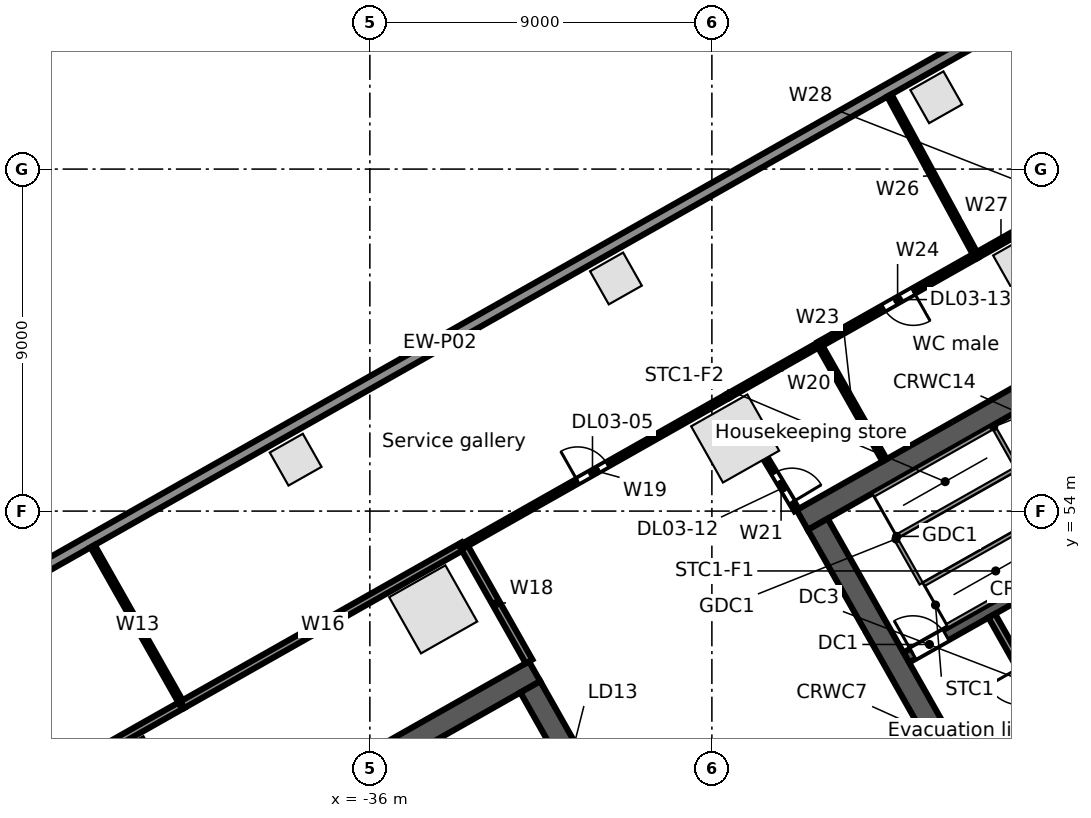
"""IFC4 building model, lengths in metres.
Left out: names, types, materials, properties, quantities, classifications, styles, units other than length and angle.
Written with IfcOpenShell. Run it as: python <this file> out.ifc"""

import sys

from ifc_helpers import new_model, si_unit, direction, frame, frame_2d, origin, origin_2d, place, context, subcontext, project, spatial, rectangle, extrude, element, fill, save


model = new_model("IFC4")
c1 = context("Model", 3, precision=1e-05, world=origin(), true_north=direction((0.0, 1.0)))
c2 = subcontext(c1, "Body", "Model", "MODEL_VIEW")
j1 = project(units=[si_unit("LENGTHUNIT", "METRE"), si_unit("PLANEANGLEUNIT", "RADIAN")], contexts=[c1])
p1 = place(None, origin())
s1 = spatial("IfcSite", under=j1, at=p1, CompositionType="ELEMENT")
p2 = place(p1, origin())
s2 = spatial("IfcBuilding", under=s1, at=p2, CompositionType="ELEMENT")
p3 = place(p2, frame((0.0, 0.0, 16.5)))
s3 = spatial("IfcBuildingStorey", under=s2, at=p3, CompositionType="ELEMENT", Elevation=16.5)
for number, where, z_axis, x_axis in (
    (1, (-18.441, 60.406, 0.0), (0.0, 0.0, 1.0), (-0.87, -0.492, 0.0)),
    (2, (-26.388, 55.91, 0.0), (0.0, 0.0, 1.0), (-0.87, -0.492, 0.0)),
    (3, (-34.334, 51.414, 0.0), (0.0, 0.0, 1.0), (-0.87, -0.492, 0.0)),
    (4, (-42.28, 46.919, 0.0), (0.0, 0.0, 1.0), (-0.87, -0.492, 0.0)),
):
    element("IfcColumn", number, at=place(p3, frame(where, z_axis=z_axis, x_axis=x_axis)), inside=s3, PredefinedType="COLUMN", context=c2, shape_type="SweptSolid", body=[
        extrude(rectangle(XDim=1.7, YDim=1.7, at=origin_2d()), origin(), (0.0, 0.0, 1.0), 5.0),
    ])
for number, where, z_axis, x_axis in (
    (5, (-21.096, 64.89, 0.0), (0.0, 0.0, 1.0), (-0.87, -0.492, 0.0)),
    (6, (-29.524, 60.122, 0.0), (0.0, 0.0, 1.0), (-0.87, -0.492, 0.0)),
    (7, (-37.953, 55.353, 0.0), (0.0, 0.0, 1.0), (-0.87, -0.492, 0.0)),
):
    element("IfcColumn", number, at=place(p3, frame(where, z_axis=z_axis, x_axis=x_axis)), inside=s3, PredefinedType="COLUMN", context=c2, shape_type="SweptSolid", body=[
        extrude(rectangle(XDim=1.0, YDim=1.0, at=origin_2d()), origin(), (0.0, 0.0, 1.0), 5.0),
    ])
p4 = place(p3, frame((-63.707, 41.701, 0.0), z_axis=(0.0, 0.0, 1.0), x_axis=(0.870355510268, 0.492423888277, 0.0)))
e8 = element("IfcWall", 8, at=p4, inside=s3, PredefinedType="STANDARD", context=c2, shape_type="SweptSolid", body=[
    extrude(rectangle(XDim=67.903, YDim=0.3, at=frame_2d((33.952, 0.0))), origin(), (0.0, 0.0, 1.0), 4.65),
])
p5 = place(p3, frame((-46.461, 41.412, 0.0), z_axis=(0.0, 0.0, 1.0), x_axis=(0.870350116061, 0.492433422375, 0.0)))
e9 = element("IfcWall", 9, at=p5, inside=s3, PredefinedType="SOLIDWALL", context=c2, shape_type="SweptSolid", body=[
    extrude(rectangle(XDim=17.0, YDim=0.6, at=frame_2d((8.5, 0.0))), origin(), (0.0, 0.0, 1.0), 4.65),
])
p6 = place(p3, frame((-31.778, 49.374, 0.0), z_axis=(0.0, 0.0, 1.0), x_axis=(0.492433046652, -0.870350328641, 0.0)))
e10 = element("IfcWall", 10, at=p6, inside=s3, PredefinedType="SOLIDWALL", context=c2, shape_type="SweptSolid", body=[
    extrude(rectangle(XDim=12.8, YDim=0.6, at=frame_2d((6.4, 0.0))), origin(), (0.0, 0.0, 1.0), 4.65),
])
p7 = place(p3, frame((-19.718, 46.316, 0.0), z_axis=(0.0, 0.0, 1.0), x_axis=(0.870353963862, 0.492426621528, 0.0)))
e11 = element("IfcWall", 11, at=p7, inside=s3, PredefinedType="SOLIDWALL", context=c2, shape_type="SweptSolid", body=[
    extrude(rectangle(XDim=4.9, YDim=0.3, at=frame_2d((2.45, 0.0))), origin(), (0.0, 0.0, 1.0), 4.65),
])
p8 = place(p7, frame((0.55, 0.0, 0.0)))
e12 = element("IfcOpeningElement", 12, at=p8, cuts=e11, PredefinedType="OPENING", context=c2, shape_type="SweptSolid", body=[
    extrude(rectangle(XDim=1.1, YDim=2.1, at=frame_2d((0.55, 1.05))), frame((0.0, 0.16, 0.0), z_axis=(0.0, -1.0, 0.0), x_axis=(1.0, 0.0, 0.0)), (0.0, 0.0, 1.0), 0.32),
])
p9 = place(p7, frame((3.65, 0.0, 0.0)))
e13 = element("IfcOpeningElement", 13, at=p9, cuts=e11, PredefinedType="OPENING", context=c2, shape_type="SweptSolid", body=[
    extrude(rectangle(XDim=0.9, YDim=2.1, at=frame_2d((0.45, 1.05))), frame((0.0, 0.16, 0.0), z_axis=(0.0, -1.0, 0.0), x_axis=(1.0, 0.0, 0.0)), (0.0, 0.0, 1.0), 0.32),
])
p10 = place(p3, frame((-21.885, 50.146, 0.0), z_axis=(0.0, 0.0, 1.0), x_axis=(0.870359411463, 0.492416992881, 0.0)))
e14 = element("IfcWall", 14, at=p10, inside=s3, PredefinedType="SOLIDWALL", context=c2, shape_type="SweptSolid", body=[
    extrude(rectangle(XDim=7.2, YDim=0.3, at=frame_2d((3.6, 0.0))), origin(), (0.0, 0.0, 1.0), 4.65),
])
p11 = place(p10, frame((0.2, 0.0, 0.0)))
e15 = element("IfcOpeningElement", 15, at=p11, cuts=e14, PredefinedType="OPENING", context=c2, shape_type="SweptSolid", body=[
    extrude(rectangle(XDim=1.0, YDim=2.1, at=frame_2d((0.5, 1.05))), frame((0.0, 0.16, 0.0), z_axis=(0.0, -1.0, 0.0), x_axis=(1.0, 0.0, 0.0)), (0.0, 0.0, 1.0), 0.32),
])
p12 = place(p3, frame((-24.623, 53.767, 0.0), z_axis=(0.0, 0.0, 1.0), x_axis=(0.870356627484, 0.492421913601, 0.0)))
e16 = element("IfcWall", 16, at=p12, inside=s3, PredefinedType="SOLIDWALL", context=c2, shape_type="SweptSolid", body=[
    extrude(rectangle(XDim=15.0, YDim=0.6, at=frame_2d((7.5, 0.0))), origin(), (0.0, 0.0, 1.0), 4.65),
])
p13 = place(p3, frame((-24.214, 53.654, 0.0), z_axis=(0.0, 0.0, 1.0), x_axis=(0.492441221355, -0.870345703448, 0.0)))
e17 = element("IfcWall", 17, at=p13, inside=s3, PredefinedType="SOLIDWALL", context=c2, shape_type="SweptSolid", body=[
    extrude(rectangle(XDim=12.8, YDim=0.6, at=frame_2d((6.4, 0.0))), origin(), (0.0, 0.0, 1.0), 4.65),
])
p14 = place(p3, frame((-19.635, 51.246, 0.0), z_axis=(0.0, 0.0, 1.0), x_axis=(0.492408451753, -0.87036424366, 0.0)))
e18 = element("IfcWall", 18, at=p14, inside=s3, PredefinedType="PARTITIONING", context=c2, shape_type="SweptSolid", body=[
    extrude(rectangle(XDim=4.1, YDim=0.2, at=frame_2d((2.05, 0.0))), origin(), (0.0, 0.0, 1.0), 4.65),
])
p15 = place(p14, frame((1.55, 0.0, 0.0)))
e19 = element("IfcOpeningElement", 19, at=p15, cuts=e18, PredefinedType="OPENING", context=c2, shape_type="SweptSolid", body=[
    extrude(rectangle(XDim=1.0, YDim=2.1, at=frame_2d((0.5, 1.05))), frame((0.0, 0.11, 0.0), z_axis=(0.0, -1.0, 0.0), x_axis=(1.0, 0.0, 0.0)), (0.0, 0.0, 1.0), 0.22),
])
p16 = place(p3, frame((-48.332, 44.719, 0.0), z_axis=(0.0, 0.0, 1.0), x_axis=(0.870331650579, 0.492466057713, 0.0)))
e20 = element("IfcWall", 20, at=p16, inside=s3, PredefinedType="PARTITIONING", context=c2, shape_type="SweptSolid", body=[
    extrude(rectangle(XDim=8.5, YDim=0.2, at=frame_2d((4.25, 0.0))), origin(), (0.0, 0.0, 1.0), 4.03),
])
p17 = place(p16, frame((3.45, 0.0, 0.0)))
e21 = element("IfcOpeningElement", 21, at=p17, cuts=e20, PredefinedType="OPENING", context=c2, shape_type="SweptSolid", body=[
    extrude(rectangle(XDim=1.8, YDim=2.1, at=frame_2d((0.9, 1.05))), frame((0.0, 0.11, 0.0), z_axis=(0.0, -1.0, 0.0), x_axis=(1.0, 0.0, 0.0)), (0.0, 0.0, 1.0), 0.22),
])
p18 = place(p3, frame((-43.295, 53.077, 0.0), z_axis=(0.0, 0.0, 1.0), x_axis=(0.492503605136, -0.87031040378, 0.0)))
e22 = element("IfcWall", 22, at=p18, inside=s3, PredefinedType="PARTITIONING", context=c2, shape_type="SweptSolid", body=[
    extrude(rectangle(XDim=4.793, YDim=0.125, at=frame_2d((2.397, 0.0))), origin(), (0.0, 0.0, 1.0), 3.93),
])
p19 = place(p3, frame((-40.934, 48.905, 0.0), z_axis=(0.0, 0.0, 1.0), x_axis=(0.870387854278, 0.492366716102, 0.0)))
e23 = element("IfcWall", 23, at=p19, inside=s3, PredefinedType="PARTITIONING", context=c2, shape_type="SweptSolid", body=[
    extrude(rectangle(XDim=8.5, YDim=0.2, at=frame_2d((4.25, 0.0))), origin(), (0.0, 0.0, 1.0), 4.03),
])
p20 = place(p3, frame((-33.536, 53.09, 0.0), z_axis=(0.0, 0.0, 1.0), x_axis=(0.492521469645, -0.870300294116, 0.0)))
e24 = element("IfcWall", 24, at=p20, inside=s3, PredefinedType="PARTITIONING", context=c2, shape_type="SweptSolid", body=[
    extrude(rectangle(XDim=3.5, YDim=0.2, at=frame_2d((1.75, 0.0))), origin(), (0.0, 0.0, 1.0), 3.93),
])
p21 = place(p3, frame((-33.536, 53.09, 0.0), z_axis=(0.0, 0.0, 1.0), x_axis=(0.870327439455, 0.492473499928, 0.0)))
e25 = element("IfcWall", 25, at=p21, inside=s3, PredefinedType="PARTITIONING", context=c2, shape_type="SweptSolid", body=[
    extrude(rectangle(XDim=8.0, YDim=0.125, at=frame_2d((4.0, 0.0))), origin(), (0.0, 0.0, 1.0), 3.712),
])
p22 = place(p21, frame((3.45, 0.0, 0.0)))
e26 = element("IfcOpeningElement", 26, at=p22, cuts=e25, PredefinedType="OPENING", context=c2, shape_type="SweptSolid", body=[
    extrude(rectangle(XDim=0.9, YDim=2.1, at=frame_2d((0.45, 1.05))), frame((0.0, 0.073, 0.0), z_axis=(0.0, -1.0, 0.0), x_axis=(1.0, 0.0, 0.0)), (0.0, 0.0, 1.0), 0.145),
])
p23 = place(p3, frame((-26.573, 57.03, 0.0), z_axis=(0.0, 0.0, 1.0), x_axis=(0.870344460795, 0.492443417626, 0.0)))
e27 = element("IfcWall", 27, at=p23, inside=s3, PredefinedType="PARTITIONING", context=c2, shape_type="SweptSolid", body=[
    extrude(rectangle(XDim=2.75, YDim=0.125, at=frame_2d((1.375, 0.0))), origin(), (0.0, 0.0, 1.0), 4.65),
])
p24 = place(p3, frame((-25.587, 55.387, 0.0), z_axis=(0.0, 0.0, 1.0), x_axis=(0.514767546849, -0.857329792268, 0.0)))
e28 = element("IfcWall", 28, at=p24, inside=s3, PredefinedType="PARTITIONING", context=c2, shape_type="SweptSolid", body=[
    extrude(rectangle(XDim=1.585, YDim=0.125, at=frame_2d((0.792, 0.0))), origin(), (0.0, 0.0, 1.0), 4.65),
])
p25 = place(p24, frame((0.45, 0.0, 0.0)))
e29 = element("IfcOpeningElement", 29, at=p25, cuts=e28, PredefinedType="OPENING", context=c2, shape_type="SweptSolid", body=[
    extrude(rectangle(XDim=0.9, YDim=2.1, at=frame_2d((0.45, 1.05))), frame((0.0, 0.073, 0.0), z_axis=(0.0, -1.0, 0.0), x_axis=(1.0, 0.0, 0.0)), (0.0, 0.0, 1.0), 0.145),
])
p26 = place(p3, frame((-24.18, 58.384, 0.0), z_axis=(0.0, 0.0, 1.0), x_axis=(0.492521469645, -0.870300294116, 0.0)))
e30 = element("IfcWall", 30, at=p26, inside=s3, PredefinedType="PARTITIONING", context=c2, shape_type="SweptSolid", body=[
    extrude(rectangle(XDim=3.5, YDim=0.125, at=frame_2d((1.75, 0.0))), origin(), (0.0, 0.0, 1.0), 3.93),
])
p27 = place(p3, frame((-24.18, 58.384, 0.0), z_axis=(0.0, 0.0, 1.0), x_axis=(0.870360772617, 0.492414587, 0.0)))
e31 = element("IfcWall", 31, at=p27, inside=s3, PredefinedType="PARTITIONING", context=c2, shape_type="SweptSolid", body=[
    extrude(rectangle(XDim=4.75, YDim=0.15, at=frame_2d((2.375, 0.0))), origin(), (0.0, 0.0, 1.0), 4.65),
])
p28 = place(p27, frame((1.95, 0.0, 0.0)))
e32 = element("IfcOpeningElement", 32, at=p28, cuts=e31, PredefinedType="OPENING", context=c2, shape_type="SweptSolid", body=[
    extrude(rectangle(XDim=0.9, YDim=2.1, at=frame_2d((0.45, 1.05))), frame((0.0, 0.085, 0.0), z_axis=(0.0, -1.0, 0.0), x_axis=(1.0, 0.0, 0.0)), (0.0, 0.0, 1.0), 0.17),
])
p29 = place(p3, frame((-22.33, 64.939, 0.0), z_axis=(0.0, 0.0, 1.0), x_axis=(0.476360236723, -0.879250206067, 0.0)))
e33 = element("IfcWall", 33, at=p29, inside=s3, PredefinedType="PARTITIONING", context=c2, shape_type="SweptSolid", body=[
    extrude(rectangle(XDim=4.795, YDim=0.125, at=frame_2d((2.397, 0.0))), origin(), (0.0, 0.0, 1.0), 3.93),
])
p30 = place(p3, frame((-20.046, 60.723, 0.0), z_axis=(0.0, 0.0, 1.0), x_axis=(0.870308175411, 0.492507542899, 0.0)))
e34 = element("IfcWall", 34, at=p30, inside=s3, PredefinedType="PARTITIONING", context=c2, shape_type="SweptSolid", body=[
    extrude(rectangle(XDim=1.5, YDim=0.15, at=frame_2d((0.75, 0.0))), origin(), (0.0, 0.0, 1.0), 3.93),
])
p31 = place(p11, origin())
e35 = element("IfcDoor", 35, at=p31, inside=s3, OperationType="SINGLE_SWING_LEFT", PredefinedType="DOOR", context=c2, shape_type="SweptSolid", body=[
    extrude(rectangle(XDim=1.0, YDim=2.1, at=frame_2d((0.5, 1.05))), frame((0.0, 0.025, 0.0), z_axis=(0.0, -1.0, 0.0), x_axis=(1.0, 0.0, 0.0)), (0.0, 0.0, 1.0), 0.05),
])
fill(e15, e35)
p32 = place(p22, origin())
e36 = element("IfcDoor", 36, at=p32, inside=s3, OperationType="SINGLE_SWING_LEFT", PredefinedType="DOOR", context=c2, shape_type="SweptSolid", body=[
    extrude(rectangle(XDim=0.9, YDim=2.1, at=frame_2d((0.45, 1.05))), frame((0.0, 0.025, 0.0), z_axis=(0.0, -1.0, 0.0), x_axis=(1.0, 0.0, 0.0)), (0.0, 0.0, 1.0), 0.05),
])
fill(e26, e36)
p33 = place(p25, origin())
e37 = element("IfcDoor", 37, at=p33, inside=s3, OperationType="SINGLE_SWING_RIGHT", PredefinedType="DOOR", context=c2, shape_type="SweptSolid", body=[
    extrude(rectangle(XDim=0.9, YDim=2.1, at=frame_2d((0.45, 1.05))), frame((0.0, 0.025, 0.0), z_axis=(0.0, -1.0, 0.0), x_axis=(1.0, 0.0, 0.0)), (0.0, 0.0, 1.0), 0.05),
])
fill(e29, e37)
p34 = place(p28, frame((0.9, 0.0, 0.0), z_axis=(0.0, 0.0, 1.0), x_axis=(-1.0, 0.0, 0.0)))
e38 = element("IfcDoor", 38, at=p34, inside=s3, OperationType="SINGLE_SWING_LEFT", PredefinedType="DOOR", context=c2, shape_type="SweptSolid", body=[
    extrude(rectangle(XDim=0.9, YDim=2.1, at=frame_2d((0.45, 1.05))), frame((0.0, 0.025, 0.0), z_axis=(0.0, -1.0, 0.0), x_axis=(1.0, 0.0, 0.0)), (0.0, 0.0, 1.0), 0.05),
])
fill(e32, e38)
save(model, sys.argv[1])
